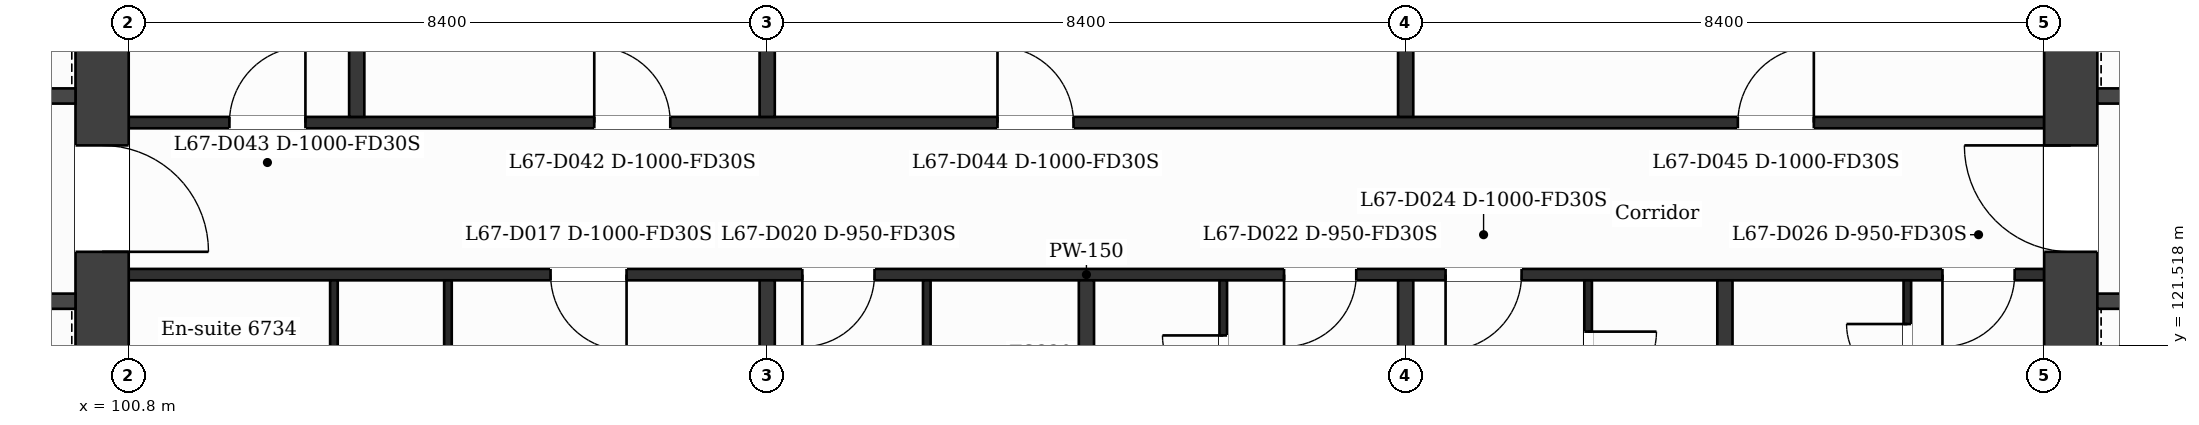
"""IFC4 building model, lengths in metres.
Left out: names, types, materials, properties, quantities, classifications, styles, units other than length and angle.
Written with IfcOpenShell. Run it as: python <this file> out.ifc"""

import sys

from ifc_helpers import new_model, si_unit, direction, frame, frame_2d, origin, place, context, subcontext, project, spatial, rectangle, extrude, element, fill, save


model = new_model("IFC4")
c1 = context("Model", 3, precision=1e-05, world=origin(), true_north=direction((0.0, 1.0)))
c2 = subcontext(c1, "Body", "Model", "MODEL_VIEW")
j1 = project(units=[si_unit("LENGTHUNIT", "METRE"), si_unit("PLANEANGLEUNIT", "RADIAN")], contexts=[c1])
p1 = place(None, origin())
s1 = spatial("IfcSite", under=j1, at=p1, CompositionType="ELEMENT")
p2 = place(p1, origin())
s2 = spatial("IfcBuilding", under=s1, at=p2, CompositionType="ELEMENT")
p3 = place(p2, frame((0.0, 0.0, 277.5)))
s3 = spatial("IfcBuildingStorey", under=s2, at=p3, CompositionType="ELEMENT", Elevation=277.5)
p4 = place(p3, frame((100.45, 132.05, 0.0), z_axis=(0.0, 0.0, 1.0), x_axis=(0.0, -1.0, 0.0)))
e1 = element("IfcWall", 1, at=p4, inside=s3, PredefinedType="SHEAR", context=c2, shape_type="SweptSolid", body=[
    extrude(rectangle(XDim=21.3, YDim=0.7, at=frame_2d((10.65, 0.0))), origin(), (0.0, 0.0, 1.0), 3.7),
])
p5 = place(p4, frame((7.9, 0.0, 0.0)))
e2 = element("IfcOpeningElement", 2, at=p5, cuts=e1, PredefinedType="OPENING", context=c2, shape_type="SweptSolid", body=[
    extrude(rectangle(XDim=1.4, YDim=2.1, at=frame_2d((0.7, 1.05))), frame((0.0, 0.36, 0.0), z_axis=(0.0, -1.0, 0.0), x_axis=(1.0, 0.0, 0.0)), (0.0, 0.0, 1.0), 0.72),
])
p6 = place(p3, frame((126.35, 110.75, 0.0), z_axis=(0.0, 0.0, 1.0), x_axis=(0.0, 1.0, 0.0)))
e3 = element("IfcWall", 3, at=p6, inside=s3, PredefinedType="SHEAR", context=c2, shape_type="SweptSolid", body=[
    extrude(rectangle(XDim=21.3, YDim=0.7, at=frame_2d((10.65, 0.0))), origin(), (0.0, 0.0, 1.0), 3.7),
])
p7 = place(p6, frame((12.0, 0.0, 0.0)))
e4 = element("IfcOpeningElement", 4, at=p7, cuts=e3, PredefinedType="OPENING", context=c2, shape_type="SweptSolid", body=[
    extrude(rectangle(XDim=1.4, YDim=2.1, at=frame_2d((0.7, 1.05))), frame((0.0, 0.36, 0.0), z_axis=(0.0, -1.0, 0.0), x_axis=(1.0, 0.0, 0.0)), (0.0, 0.0, 1.0), 0.72),
])
p8 = place(p3, frame((95.227, 122.1, 0.0), z_axis=(0.0, 0.0, 1.0), x_axis=(1.0, 0.0, 0.0)))
e5 = element("IfcWall", 5, at=p8, inside=s3, PredefinedType="PARTITIONING", context=c2, shape_type="SweptSolid", body=[
    extrude(rectangle(XDim=4.873, YDim=0.2, at=frame_2d((2.437, 0.0))), origin(), (0.0, 0.0, 1.0), 3.38),
])
p9 = place(p8, frame((0.605, 0.0, 0.0)))
e6 = element("IfcOpeningElement", 6, at=p9, cuts=e5, PredefinedType="OPENING", context=c2, shape_type="SweptSolid", body=[
    extrude(rectangle(XDim=1.1, YDim=2.1, at=frame_2d((0.55, 1.05))), frame((0.0, 0.11, 0.0), z_axis=(0.0, -1.0, 0.0), x_axis=(1.0, 0.0, 0.0)), (0.0, 0.0, 1.0), 0.22),
])
p10 = place(p8, frame((2.946, 0.0, 0.0)))
e7 = element("IfcOpeningElement", 7, at=p10, cuts=e5, PredefinedType="OPENING", context=c2, shape_type="SweptSolid", body=[
    extrude(rectangle(XDim=1.1, YDim=2.1, at=frame_2d((0.55, 1.05))), frame((0.0, 0.11, 0.0), z_axis=(0.0, -1.0, 0.0), x_axis=(1.0, 0.0, 0.0)), (0.0, 0.0, 1.0), 0.22),
])
p11 = place(p3, frame((126.7, 122.1, 0.0), z_axis=(0.0, 0.0, 1.0), x_axis=(1.0, 0.0, 0.0)))
e8 = element("IfcWall", 8, at=p11, inside=s3, PredefinedType="PARTITIONING", context=c2, shape_type="SweptSolid", body=[
    extrude(rectangle(XDim=4.873, YDim=0.2, at=frame_2d((2.437, 0.0))), origin(), (0.0, 0.0, 1.0), 3.38),
])
p12 = place(p11, frame((3.105, 0.0, 0.0)))
e9 = element("IfcOpeningElement", 9, at=p12, cuts=e8, PredefinedType="OPENING", context=c2, shape_type="SweptSolid", body=[
    extrude(rectangle(XDim=1.1, YDim=2.1, at=frame_2d((0.55, 1.05))), frame((0.0, 0.11, 0.0), z_axis=(0.0, -1.0, 0.0), x_axis=(1.0, 0.0, 0.0)), (0.0, 0.0, 1.0), 0.22),
])
p13 = place(p11, frame((0.668, 0.0, 0.0)))
e10 = element("IfcOpeningElement", 10, at=p13, cuts=e8, PredefinedType="OPENING", context=c2, shape_type="SweptSolid", body=[
    extrude(rectangle(XDim=1.1, YDim=2.1, at=frame_2d((0.55, 1.05))), frame((0.0, 0.11, 0.0), z_axis=(0.0, -1.0, 0.0), x_axis=(1.0, 0.0, 0.0)), (0.0, 0.0, 1.0), 0.22),
])
p14 = place(p3, frame((100.8, 122.45, 0.0), z_axis=(0.0, 0.0, 1.0), x_axis=(1.0, 0.0, 0.0)))
e11 = element("IfcWall", 11, at=p14, inside=s3, PredefinedType="PARTITIONING", context=c2, shape_type="SweptSolid", body=[
    extrude(rectangle(XDim=25.2, YDim=0.15, at=frame_2d((12.6, 0.0))), origin(), (0.0, 0.0, 1.0), 3.38),
])
p15 = place(p14, frame((5.55, 0.0, 0.0)))
e12 = element("IfcOpeningElement", 12, at=p15, cuts=e11, PredefinedType="OPENING", context=c2, shape_type="SweptSolid", body=[
    extrude(rectangle(XDim=1.0, YDim=2.1, at=frame_2d((0.5, 1.05))), frame((0.0, 0.085, 0.0), z_axis=(0.0, -1.0, 0.0), x_axis=(1.0, 0.0, 0.0)), (0.0, 0.0, 1.0), 0.17),
])
p16 = place(p14, frame((8.862, 0.0, 0.0)))
e13 = element("IfcOpeningElement", 13, at=p16, cuts=e11, PredefinedType="OPENING", context=c2, shape_type="SweptSolid", body=[
    extrude(rectangle(XDim=0.95, YDim=2.1, at=frame_2d((0.475, 1.05))), frame((0.0, 0.085, 0.0), z_axis=(0.0, -1.0, 0.0), x_axis=(1.0, 0.0, 0.0)), (0.0, 0.0, 1.0), 0.17),
])
p17 = place(p14, frame((15.2, 0.0, 0.0)))
e14 = element("IfcOpeningElement", 14, at=p17, cuts=e11, PredefinedType="OPENING", context=c2, shape_type="SweptSolid", body=[
    extrude(rectangle(XDim=0.95, YDim=2.1, at=frame_2d((0.475, 1.05))), frame((0.0, 0.085, 0.0), z_axis=(0.0, -1.0, 0.0), x_axis=(1.0, 0.0, 0.0)), (0.0, 0.0, 1.0), 0.17),
])
p18 = place(p14, frame((17.325, 0.0, 0.0)))
e15 = element("IfcOpeningElement", 15, at=p18, cuts=e11, PredefinedType="OPENING", context=c2, shape_type="SweptSolid", body=[
    extrude(rectangle(XDim=1.0, YDim=2.1, at=frame_2d((0.5, 1.05))), frame((0.0, 0.085, 0.0), z_axis=(0.0, -1.0, 0.0), x_axis=(1.0, 0.0, 0.0)), (0.0, 0.0, 1.0), 0.17),
])
p19 = place(p14, frame((23.862, 0.0, 0.0)))
e16 = element("IfcOpeningElement", 16, at=p19, cuts=e11, PredefinedType="OPENING", context=c2, shape_type="SweptSolid", body=[
    extrude(rectangle(XDim=0.95, YDim=2.1, at=frame_2d((0.475, 1.05))), frame((0.0, 0.085, 0.0), z_axis=(0.0, -1.0, 0.0), x_axis=(1.0, 0.0, 0.0)), (0.0, 0.0, 1.0), 0.17),
])
p20 = place(p3, frame((100.8, 124.45, 0.0), z_axis=(0.0, 0.0, 1.0), x_axis=(1.0, 0.0, 0.0)))
e17 = element("IfcWall", 17, at=p20, inside=s3, PredefinedType="PARTITIONING", context=c2, shape_type="SweptSolid", body=[
    extrude(rectangle(XDim=25.2, YDim=0.15, at=frame_2d((12.6, 0.0))), origin(), (0.0, 0.0, 1.0), 3.38),
])
p21 = place(p20, frame((6.125, 0.0, 0.0)))
e18 = element("IfcOpeningElement", 18, at=p21, cuts=e17, PredefinedType="OPENING", context=c2, shape_type="SweptSolid", body=[
    extrude(rectangle(XDim=1.0, YDim=2.1, at=frame_2d((0.5, 1.05))), frame((0.0, 0.085, 0.0), z_axis=(0.0, -1.0, 0.0), x_axis=(1.0, 0.0, 0.0)), (0.0, 0.0, 1.0), 0.17),
])
p22 = place(p20, frame((1.325, 0.0, 0.0)))
e19 = element("IfcOpeningElement", 19, at=p22, cuts=e17, PredefinedType="OPENING", context=c2, shape_type="SweptSolid", body=[
    extrude(rectangle(XDim=1.0, YDim=2.1, at=frame_2d((0.5, 1.05))), frame((0.0, 0.085, 0.0), z_axis=(0.0, -1.0, 0.0), x_axis=(1.0, 0.0, 0.0)), (0.0, 0.0, 1.0), 0.17),
])
p23 = place(p20, frame((11.43, 0.0, 0.0)))
e20 = element("IfcOpeningElement", 20, at=p23, cuts=e17, PredefinedType="OPENING", context=c2, shape_type="SweptSolid", body=[
    extrude(rectangle(XDim=1.0, YDim=2.1, at=frame_2d((0.5, 1.05))), frame((0.0, 0.085, 0.0), z_axis=(0.0, -1.0, 0.0), x_axis=(1.0, 0.0, 0.0)), (0.0, 0.0, 1.0), 0.17),
])
p24 = place(p20, frame((21.17, 0.0, 0.0)))
e21 = element("IfcOpeningElement", 21, at=p24, cuts=e17, PredefinedType="OPENING", context=c2, shape_type="SweptSolid", body=[
    extrude(rectangle(XDim=1.0, YDim=2.1, at=frame_2d((0.5, 1.05))), frame((0.0, 0.085, 0.0), z_axis=(0.0, -1.0, 0.0), x_axis=(1.0, 0.0, 0.0)), (0.0, 0.0, 1.0), 0.17),
])
p25 = place(p3, frame((92.702, 124.8, 0.0), z_axis=(0.0, 0.0, 1.0), x_axis=(1.0, 0.0, 0.0)))
e22 = element("IfcWall", 22, at=p25, inside=s3, PredefinedType="PARTITIONING", context=c2, shape_type="SweptSolid", body=[
    extrude(rectangle(XDim=7.398, YDim=0.2, at=frame_2d((3.699, 0.0))), origin(), (0.0, 0.0, 1.0), 3.38),
])
p26 = place(p25, frame((5.636, 0.0, 0.0)))
e23 = element("IfcOpeningElement", 23, at=p26, cuts=e22, PredefinedType="OPENING", context=c2, shape_type="SweptSolid", body=[
    extrude(rectangle(XDim=1.1, YDim=2.1, at=frame_2d((0.55, 1.05))), frame((0.0, 0.11, 0.0), z_axis=(0.0, -1.0, 0.0), x_axis=(1.0, 0.0, 0.0)), (0.0, 0.0, 1.0), 0.22),
])
p27 = place(p3, frame((126.7, 124.8, 0.0), z_axis=(0.0, 0.0, 1.0), x_axis=(1.0, 0.0, 0.0)))
e24 = element("IfcWall", 24, at=p27, inside=s3, PredefinedType="PARTITIONING", context=c2, shape_type="SweptSolid", body=[
    extrude(rectangle(XDim=4.849, YDim=0.2, at=frame_2d((2.424, 0.0))), origin(), (0.0, 0.0, 1.0), 3.38),
])
p28 = place(p27, frame((0.818, 0.0, 0.0)))
e25 = element("IfcOpeningElement", 25, at=p28, cuts=e24, PredefinedType="OPENING", context=c2, shape_type="SweptSolid", body=[
    extrude(rectangle(XDim=1.1, YDim=2.1, at=frame_2d((0.55, 1.05))), frame((0.0, 0.11, 0.0), z_axis=(0.0, -1.0, 0.0), x_axis=(1.0, 0.0, 0.0)), (0.0, 0.0, 1.0), 0.22),
])
p29 = place(p3, frame((103.5, 120.4, 0.0), z_axis=(0.0, 0.0, 1.0), x_axis=(0.0, 1.0, 0.0)))
e26 = element("IfcWall", 26, at=p29, inside=s3, PredefinedType="PARTITIONING", context=c2, shape_type="SweptSolid", body=[
    extrude(rectangle(XDim=1.975, YDim=0.1, at=frame_2d((0.988, 0.0))), origin(), (0.0, 0.0, 1.0), 3.38),
])
p30 = place(p3, frame((103.8, 124.525, 0.0), z_axis=(0.0, 0.0, 1.0), x_axis=(0.0, 1.0, 0.0)))
e27 = element("IfcWall", 27, at=p30, inside=s3, PredefinedType="PARTITIONING", context=c2, shape_type="SweptSolid", body=[
    extrude(rectangle(XDim=5.825, YDim=0.2, at=frame_2d((2.913, 0.0))), origin(), (0.0, 0.0, 1.0), 3.38),
])
p31 = place(p3, frame((105.0, 110.55, 0.0), z_axis=(0.0, 0.0, 1.0), x_axis=(0.0, 1.0, 0.0)))
e28 = element("IfcWall", 28, at=p31, inside=s3, PredefinedType="PARTITIONING", context=c2, shape_type="SweptSolid", body=[
    extrude(rectangle(XDim=11.825, YDim=0.1, at=frame_2d((5.913, 0.0))), origin(), (0.0, 0.0, 1.0), 3.38),
])
p32 = place(p31, frame((9.09, 0.0, 0.0)))
e29 = element("IfcOpeningElement", 29, at=p32, cuts=e28, PredefinedType="OPENING", context=c2, shape_type="SweptSolid", body=[
    extrude(rectangle(XDim=0.9, YDim=2.1, at=frame_2d((0.45, 1.05))), frame((0.0, 0.06, 0.0), z_axis=(0.0, -1.0, 0.0), x_axis=(1.0, 0.0, 0.0)), (0.0, 0.0, 1.0), 0.12),
])
p33 = place(p3, frame((109.2, 110.55, 0.0), z_axis=(0.0, 0.0, 1.0), x_axis=(0.0, 1.0, 0.0)))
e30 = element("IfcWall", 30, at=p33, inside=s3, PredefinedType="PARTITIONING", context=c2, shape_type="SweptSolid", body=[
    extrude(rectangle(XDim=11.825, YDim=0.2, at=frame_2d((5.913, 0.0))), origin(), (0.0, 0.0, 1.0), 3.38),
])
p34 = place(p3, frame((109.2, 124.525, 0.0), z_axis=(0.0, 0.0, 1.0), x_axis=(0.0, 1.0, 0.0)))
e31 = element("IfcWall", 31, at=p34, inside=s3, PredefinedType="PARTITIONING", context=c2, shape_type="SweptSolid", body=[
    extrude(rectangle(XDim=9.2, YDim=0.2, at=frame_2d((4.6, 0.0))), origin(), (0.0, 0.0, 1.0), 3.38),
])
p35 = place(p3, frame((111.3, 119.8, 0.0), z_axis=(0.0, 0.0, 1.0), x_axis=(0.0, 1.0, 0.0)))
e32 = element("IfcWall", 32, at=p35, inside=s3, PredefinedType="PARTITIONING", context=c2, shape_type="SweptSolid", body=[
    extrude(rectangle(XDim=2.575, YDim=0.1, at=frame_2d((1.288, 0.0))), origin(), (0.0, 0.0, 1.0), 3.38),
])
p36 = place(p35, frame((0.6, 0.0, 0.0)))
e33 = element("IfcOpeningElement", 33, at=p36, cuts=e32, PredefinedType="OPENING", context=c2, shape_type="SweptSolid", body=[
    extrude(rectangle(XDim=0.8, YDim=2.1, at=frame_2d((0.4, 1.05))), frame((0.0, 0.06, 0.0), z_axis=(0.0, -1.0, 0.0), x_axis=(1.0, 0.0, 0.0)), (0.0, 0.0, 1.0), 0.12),
])
p37 = place(p3, frame((113.4, 110.55, 0.0), z_axis=(0.0, 0.0, 1.0), x_axis=(0.0, 1.0, 0.0)))
e34 = element("IfcWall", 34, at=p37, inside=s3, PredefinedType="PARTITIONING", context=c2, shape_type="SweptSolid", body=[
    extrude(rectangle(XDim=11.825, YDim=0.2, at=frame_2d((5.913, 0.0))), origin(), (0.0, 0.0, 1.0), 3.38),
])
p38 = place(p3, frame((115.2, 120.1, 0.0), z_axis=(0.0, 0.0, 1.0), x_axis=(0.0, 1.0, 0.0)))
e35 = element("IfcWall", 35, at=p38, inside=s3, PredefinedType="PARTITIONING", context=c2, shape_type="SweptSolid", body=[
    extrude(rectangle(XDim=2.275, YDim=0.1, at=frame_2d((1.137, 0.0))), origin(), (0.0, 0.0, 1.0), 3.38),
])
p39 = place(p38, frame((0.75, 0.0, 0.0)))
e36 = element("IfcOpeningElement", 36, at=p39, cuts=e35, PredefinedType="OPENING", context=c2, shape_type="SweptSolid", body=[
    extrude(rectangle(XDim=0.8, YDim=2.1, at=frame_2d((0.4, 1.05))), frame((0.0, 0.06, 0.0), z_axis=(0.0, -1.0, 0.0), x_axis=(1.0, 0.0, 0.0)), (0.0, 0.0, 1.0), 0.12),
])
p40 = place(p3, frame((117.6, 110.55, 0.0), z_axis=(0.0, 0.0, 1.0), x_axis=(0.0, 1.0, 0.0)))
e37 = element("IfcWall", 37, at=p40, inside=s3, PredefinedType="PARTITIONING", context=c2, shape_type="SweptSolid", body=[
    extrude(rectangle(XDim=11.825, YDim=0.2, at=frame_2d((5.913, 0.0))), origin(), (0.0, 0.0, 1.0), 3.38),
])
p41 = place(p3, frame((117.6, 124.525, 0.0), z_axis=(0.0, 0.0, 1.0), x_axis=(0.0, 1.0, 0.0)))
e38 = element("IfcWall", 38, at=p41, inside=s3, PredefinedType="PARTITIONING", context=c2, shape_type="SweptSolid", body=[
    extrude(rectangle(XDim=9.2, YDim=0.2, at=frame_2d((4.6, 0.0))), origin(), (0.0, 0.0, 1.0), 3.38),
])
p42 = place(p3, frame((120.0, 120.1, 0.0), z_axis=(0.0, 0.0, 1.0), x_axis=(0.0, 1.0, 0.0)))
e39 = element("IfcWall", 39, at=p42, inside=s3, PredefinedType="PARTITIONING", context=c2, shape_type="SweptSolid", body=[
    extrude(rectangle(XDim=2.275, YDim=0.1, at=frame_2d((1.137, 0.0))), origin(), (0.0, 0.0, 1.0), 3.38),
])
p43 = place(p42, frame((0.7, 0.0, 0.0)))
e40 = element("IfcOpeningElement", 40, at=p43, cuts=e39, PredefinedType="OPENING", context=c2, shape_type="SweptSolid", body=[
    extrude(rectangle(XDim=0.9, YDim=2.1, at=frame_2d((0.45, 1.05))), frame((0.0, 0.06, 0.0), z_axis=(0.0, -1.0, 0.0), x_axis=(1.0, 0.0, 0.0)), (0.0, 0.0, 1.0), 0.12),
])
p44 = place(p3, frame((121.8, 110.55, 0.0), z_axis=(0.0, 0.0, 1.0), x_axis=(0.0, 1.0, 0.0)))
e41 = element("IfcWall", 41, at=p44, inside=s3, PredefinedType="PARTITIONING", context=c2, shape_type="SweptSolid", body=[
    extrude(rectangle(XDim=11.825, YDim=0.2, at=frame_2d((5.913, 0.0))), origin(), (0.0, 0.0, 1.0), 3.38),
])
p45 = place(p3, frame((124.2, 119.8, 0.0), z_axis=(0.0, 0.0, 1.0), x_axis=(0.0, 1.0, 0.0)))
e42 = element("IfcWall", 42, at=p45, inside=s3, PredefinedType="PARTITIONING", context=c2, shape_type="SweptSolid", body=[
    extrude(rectangle(XDim=2.575, YDim=0.1, at=frame_2d((1.288, 0.0))), origin(), (0.0, 0.0, 1.0), 3.38),
])
p46 = place(p45, frame((1.2, 0.0, 0.0)))
e43 = element("IfcOpeningElement", 43, at=p46, cuts=e42, PredefinedType="OPENING", context=c2, shape_type="SweptSolid", body=[
    extrude(rectangle(XDim=0.8, YDim=2.1, at=frame_2d((0.4, 1.05))), frame((0.0, 0.06, 0.0), z_axis=(0.0, -1.0, 0.0), x_axis=(1.0, 0.0, 0.0)), (0.0, 0.0, 1.0), 0.12),
])
p47 = place(p15, origin())
e44 = element("IfcDoor", 44, at=p47, inside=s3, OperationType="SINGLE_SWING_RIGHT", PredefinedType="DOOR", context=c2, shape_type="SweptSolid", body=[
    extrude(rectangle(XDim=1.0, YDim=2.1, at=frame_2d((0.5, 1.05))), frame((0.0, 0.025, 0.0), z_axis=(0.0, -1.0, 0.0), x_axis=(1.0, 0.0, 0.0)), (0.0, 0.0, 1.0), 0.05),
])
fill(e12, e44)
p48 = place(p16, origin())
e45 = element("IfcDoor", 45, at=p48, inside=s3, OperationType="SINGLE_SWING_LEFT", PredefinedType="DOOR", context=c2, shape_type="SweptSolid", body=[
    extrude(rectangle(XDim=0.95, YDim=2.1, at=frame_2d((0.475, 1.05))), frame((0.0, 0.025, 0.0), z_axis=(0.0, -1.0, 0.0), x_axis=(1.0, 0.0, 0.0)), (0.0, 0.0, 1.0), 0.05),
])
fill(e13, e45)
p49 = place(p17, origin())
e46 = element("IfcDoor", 46, at=p49, inside=s3, OperationType="SINGLE_SWING_LEFT", PredefinedType="DOOR", context=c2, shape_type="SweptSolid", body=[
    extrude(rectangle(XDim=0.95, YDim=2.1, at=frame_2d((0.475, 1.05))), frame((0.0, 0.025, 0.0), z_axis=(0.0, -1.0, 0.0), x_axis=(1.0, 0.0, 0.0)), (0.0, 0.0, 1.0), 0.05),
])
fill(e14, e46)
p50 = place(p39, origin())
e47 = element("IfcDoor", 47, at=p50, inside=s3, OperationType="SINGLE_SWING_RIGHT", PredefinedType="DOOR", context=c2, shape_type="SweptSolid", body=[
    extrude(rectangle(XDim=0.8, YDim=2.1, at=frame_2d((0.4, 1.05))), frame((0.0, 0.025, 0.0), z_axis=(0.0, -1.0, 0.0), x_axis=(1.0, 0.0, 0.0)), (0.0, 0.0, 1.0), 0.05),
])
fill(e36, e47)
p51 = place(p18, origin())
e48 = element("IfcDoor", 48, at=p51, inside=s3, OperationType="SINGLE_SWING_LEFT", PredefinedType="DOOR", context=c2, shape_type="SweptSolid", body=[
    extrude(rectangle(XDim=1.0, YDim=2.1, at=frame_2d((0.5, 1.05))), frame((0.0, 0.025, 0.0), z_axis=(0.0, -1.0, 0.0), x_axis=(1.0, 0.0, 0.0)), (0.0, 0.0, 1.0), 0.05),
])
fill(e15, e48)
p52 = place(p43, origin())
e49 = element("IfcDoor", 49, at=p52, inside=s3, OperationType="SINGLE_SWING_RIGHT", PredefinedType="DOOR", context=c2, shape_type="SweptSolid", body=[
    extrude(rectangle(XDim=0.9, YDim=2.1, at=frame_2d((0.45, 1.05))), frame((0.0, 0.025, 0.0), z_axis=(0.0, -1.0, 0.0), x_axis=(1.0, 0.0, 0.0)), (0.0, 0.0, 1.0), 0.05),
])
fill(e40, e49)
p53 = place(p19, origin())
e50 = element("IfcDoor", 50, at=p53, inside=s3, OperationType="SINGLE_SWING_LEFT", PredefinedType="DOOR", context=c2, shape_type="SweptSolid", body=[
    extrude(rectangle(XDim=0.95, YDim=2.1, at=frame_2d((0.475, 1.05))), frame((0.0, 0.025, 0.0), z_axis=(0.0, -1.0, 0.0), x_axis=(1.0, 0.0, 0.0)), (0.0, 0.0, 1.0), 0.05),
])
fill(e16, e50)
p54 = place(p46, origin())
e51 = element("IfcDoor", 51, at=p54, inside=s3, OperationType="SINGLE_SWING_RIGHT", PredefinedType="DOOR", context=c2, shape_type="SweptSolid", body=[
    extrude(rectangle(XDim=0.8, YDim=2.1, at=frame_2d((0.4, 1.05))), frame((0.0, 0.025, 0.0), z_axis=(0.0, -1.0, 0.0), x_axis=(1.0, 0.0, 0.0)), (0.0, 0.0, 1.0), 0.05),
])
fill(e43, e51)
p55 = place(p21, origin())
e52 = element("IfcDoor", 52, at=p55, inside=s3, OperationType="SINGLE_SWING_LEFT", PredefinedType="DOOR", context=c2, shape_type="SweptSolid", body=[
    extrude(rectangle(XDim=1.0, YDim=2.1, at=frame_2d((0.5, 1.05))), frame((0.0, 0.025, 0.0), z_axis=(0.0, -1.0, 0.0), x_axis=(1.0, 0.0, 0.0)), (0.0, 0.0, 1.0), 0.05),
])
fill(e18, e52)
p56 = place(p22, origin())
e53 = element("IfcDoor", 53, at=p56, inside=s3, OperationType="SINGLE_SWING_RIGHT", PredefinedType="DOOR", context=c2, shape_type="SweptSolid", body=[
    extrude(rectangle(XDim=1.0, YDim=2.1, at=frame_2d((0.5, 1.05))), frame((0.0, 0.025, 0.0), z_axis=(0.0, -1.0, 0.0), x_axis=(1.0, 0.0, 0.0)), (0.0, 0.0, 1.0), 0.05),
])
fill(e19, e53)
p57 = place(p23, origin())
e54 = element("IfcDoor", 54, at=p57, inside=s3, OperationType="SINGLE_SWING_LEFT", PredefinedType="DOOR", context=c2, shape_type="SweptSolid", body=[
    extrude(rectangle(XDim=1.0, YDim=2.1, at=frame_2d((0.5, 1.05))), frame((0.0, 0.025, 0.0), z_axis=(0.0, -1.0, 0.0), x_axis=(1.0, 0.0, 0.0)), (0.0, 0.0, 1.0), 0.05),
])
fill(e20, e54)
p58 = place(p24, origin())
e55 = element("IfcDoor", 55, at=p58, inside=s3, OperationType="SINGLE_SWING_RIGHT", PredefinedType="DOOR", context=c2, shape_type="SweptSolid", body=[
    extrude(rectangle(XDim=1.0, YDim=2.1, at=frame_2d((0.5, 1.05))), frame((0.0, 0.025, 0.0), z_axis=(0.0, -1.0, 0.0), x_axis=(1.0, 0.0, 0.0)), (0.0, 0.0, 1.0), 0.05),
])
fill(e21, e55)
p59 = place(p5, origin())
e56 = element("IfcDoor", 56, at=p59, inside=s3, OperationType="SINGLE_SWING_RIGHT", PredefinedType="DOOR", context=c2, shape_type="SweptSolid", body=[
    extrude(rectangle(XDim=1.4, YDim=2.1, at=frame_2d((0.7, 1.05))), frame((0.0, 0.025, 0.0), z_axis=(0.0, -1.0, 0.0), x_axis=(1.0, 0.0, 0.0)), (0.0, 0.0, 1.0), 0.05),
])
fill(e2, e56)
p60 = place(p7, origin())
e57 = element("IfcDoor", 57, at=p60, inside=s3, OperationType="SINGLE_SWING_RIGHT", PredefinedType="DOOR", context=c2, shape_type="SweptSolid", body=[
    extrude(rectangle(XDim=1.4, YDim=2.1, at=frame_2d((0.7, 1.05))), frame((0.0, 0.025, 0.0), z_axis=(0.0, -1.0, 0.0), x_axis=(1.0, 0.0, 0.0)), (0.0, 0.0, 1.0), 0.05),
])
fill(e4, e57)
save(model, sys.argv[1])
